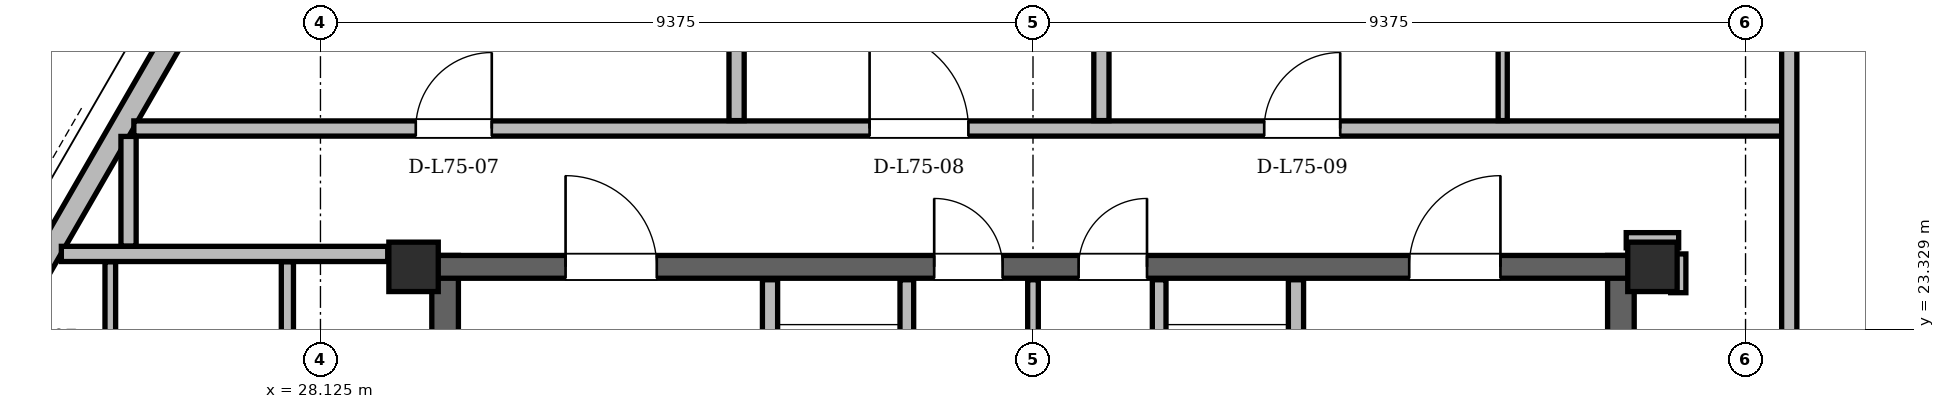
"""IFC4 building model, lengths in metres.
Left out: names, types, materials, properties, quantities, classifications, styles, units other than length and angle.
Written with IfcOpenShell. Run it as: python <this file> out.ifc"""

import sys

from ifc_helpers import new_model, si_unit, direction, frame, frame_2d, origin, origin_2d, place, context, subcontext, project, spatial, rectangle, hollow_rectangle, extrude, element, fill, save


model = new_model("IFC4")
c1 = context("Model", 3, precision=1e-05, world=origin(), true_north=direction((0.0, 1.0)))
c2 = subcontext(c1, "Body", "Model", "MODEL_VIEW")
j1 = project(units=[si_unit("LENGTHUNIT", "METRE"), si_unit("PLANEANGLEUNIT", "RADIAN")], contexts=[c1])
p1 = place(None, origin())
s1 = spatial("IfcSite", under=j1, at=p1, CompositionType="ELEMENT")
p2 = place(p1, origin())
s2 = spatial("IfcBuilding", under=s1, at=p2, CompositionType="ELEMENT")
p3 = place(p2, frame((0.0, 0.0, 285.0)))
s3 = spatial("IfcBuildingStorey", under=s2, at=p3, CompositionType="ELEMENT", Elevation=285.0)
for number, where, z_axis, x_axis in (
    (1, (45.65, 24.15, 0.0), (0.0, 0.0, 1.0), (1.0, 0.0, 0.0)),
    (2, (29.35, 24.15, 0.0), (0.0, 0.0, 1.0), (1.0, 0.0, 0.0)),
):
    element("IfcColumn", number, at=place(p3, frame(where, z_axis=z_axis, x_axis=x_axis)), inside=s3, PredefinedType="COLUMN", context=c2, shape_type="SweptSolid", body=[
        extrude(hollow_rectangle(XDim=0.65, YDim=0.65, WallThickness=0.05, at=origin_2d()), origin(), (0.0, 0.0, 1.0), 3.9),
    ])
for number, where, z_axis, x_axis in (
    (3, (29.765, 11.0, 0.0), (0.0, 0.0, 1.0), (0.0, 1.0, 0.0)),
    (4, (45.235, 11.0, 0.0), (0.0, 0.0, 1.0), (0.0, 1.0, 0.0)),
):
    element("IfcWall", number, at=place(p3, frame(where, z_axis=z_axis, x_axis=x_axis)), inside=s3, PredefinedType="SHEAR", context=c2, shape_type="SweptSolid", body=[
        extrude(rectangle(XDim=13.3, YDim=0.35, at=frame_2d((6.65, 0.0))), origin(), (0.0, 0.0, 1.0), 3.68),
    ])
p4 = place(p3, frame((29.65, 24.15, 0.0), z_axis=(0.0, 0.0, 1.0), x_axis=(1.0, 0.0, 0.0)))
e5 = element("IfcWall", 5, at=p4, inside=s3, PredefinedType="SHEAR", context=c2, shape_type="SweptSolid", body=[
    extrude(rectangle(XDim=15.7, YDim=0.3, at=frame_2d((7.85, 0.0))), origin(), (0.0, 0.0, 1.0), 3.68),
])
p5 = place(p4, frame((1.7, 0.0, 0.0)))
e6 = element("IfcOpeningElement", 6, at=p5, cuts=e5, PredefinedType="OPENING", context=c2, shape_type="SweptSolid", body=[
    extrude(rectangle(XDim=1.2, YDim=2.2, at=frame_2d((0.6, 1.1))), frame((0.0, 0.15, 0.0), z_axis=(0.0, -1.0, 0.0), x_axis=(1.0, 0.0, 0.0)), (0.0, 0.0, 1.0), 0.3),
])
p6 = place(p4, frame((12.8, 0.0, 0.0)))
e7 = element("IfcOpeningElement", 7, at=p6, cuts=e5, PredefinedType="OPENING", context=c2, shape_type="SweptSolid", body=[
    extrude(rectangle(XDim=1.2, YDim=2.2, at=frame_2d((0.6, 1.1))), frame((0.0, 0.15, 0.0), z_axis=(0.0, -1.0, 0.0), x_axis=(1.0, 0.0, 0.0)), (0.0, 0.0, 1.0), 0.3),
])
p7 = place(p4, frame((6.55, 0.0, 0.0)))
e8 = element("IfcOpeningElement", 8, at=p7, cuts=e5, PredefinedType="OPENING", context=c2, shape_type="SweptSolid", body=[
    extrude(rectangle(XDim=0.9, YDim=2.05, at=frame_2d((0.45, 1.025))), frame((0.0, 0.15, 0.0), z_axis=(0.0, -1.0, 0.0), x_axis=(1.0, 0.0, 0.0)), (0.0, 0.0, 1.0), 0.3),
])
p8 = place(p4, frame((8.45, 0.0, 0.0)))
e9 = element("IfcOpeningElement", 9, at=p8, cuts=e5, PredefinedType="OPENING", context=c2, shape_type="SweptSolid", body=[
    extrude(rectangle(XDim=0.9, YDim=2.05, at=frame_2d((0.45, 1.025))), frame((0.0, 0.15, 0.0), z_axis=(0.0, -1.0, 0.0), x_axis=(1.0, 0.0, 0.0)), (0.0, 0.0, 1.0), 0.3),
])
p9 = place(p3, frame((58.415, 10.535, 0.0), z_axis=(0.0, 0.0, 1.0), x_axis=(-0.499999864727, 0.866025481884, 0.0)))
e10 = element("IfcWall", 10, at=p9, inside=s3, PredefinedType="SOLIDWALL", context=c2, shape_type="SweptSolid", body=[
    extrude(rectangle(XDim=37.481, YDim=0.29, at=frame_2d((18.74, 0.0))), origin(), (0.0, 0.0, 1.0), 3.058),
])
p10 = place(p9, frame((7.504, 0.0, 0.0)))
e11 = element("IfcOpeningElement", 11, at=p10, cuts=e10, PredefinedType="OPENING", context=c2, shape_type="SweptSolid", body=[
    extrude(rectangle(XDim=1.3, YDim=2.2, at=frame_2d((0.65, 1.1))), frame((0.0, 0.145, 0.0), z_axis=(0.0, -1.0, 0.0), x_axis=(1.0, 0.0, 0.0)), (0.0, 0.0, 1.0), 0.29),
])
p11 = place(p9, frame((32.341, 0.0, 0.0)))
e12 = element("IfcOpeningElement", 12, at=p11, cuts=e10, PredefinedType="OPENING", context=c2, shape_type="SweptSolid", body=[
    extrude(rectangle(XDim=1.5, YDim=2.2, at=frame_2d((0.75, 1.1))), frame((0.0, 0.145, 0.0), z_axis=(0.0, -1.0, 0.0), x_axis=(1.0, 0.0, 0.0)), (0.0, 0.0, 1.0), 0.29),
])
p12 = place(p9, frame((12.54, 0.0, 0.85)))
e13 = element("IfcOpeningElement", 13, at=p12, cuts=e10, PredefinedType="OPENING", context=c2, shape_type="SweptSolid", body=[
    extrude(rectangle(XDim=1.4, YDim=1.6, at=frame_2d((0.7, 0.8))), frame((0.0, 0.145, 0.0), z_axis=(0.0, -1.0, 0.0), x_axis=(1.0, 0.0, 0.0)), (0.0, 0.0, 1.0), 0.29),
])
p13 = place(p9, frame((17.705, 0.0, 0.85)))
e14 = element("IfcOpeningElement", 14, at=p13, cuts=e10, PredefinedType="OPENING", context=c2, shape_type="SweptSolid", body=[
    extrude(rectangle(XDim=2.5, YDim=2.098, at=frame_2d((1.25, 1.049))), frame((0.0, 0.145, 0.0), z_axis=(0.0, -1.0, 0.0), x_axis=(1.0, 0.0, 0.0)), (0.0, 0.0, 1.0), 0.29),
])
p14 = place(p9, frame((2.467, 0.0, 0.85)))
e15 = element("IfcOpeningElement", 15, at=p14, cuts=e10, PredefinedType="OPENING", context=c2, shape_type="SweptSolid", body=[
    extrude(rectangle(XDim=2.5, YDim=2.098, at=frame_2d((1.25, 1.049))), frame((0.0, 0.145, 0.0), z_axis=(0.0, -1.0, 0.0), x_axis=(1.0, 0.0, 0.0)), (0.0, 0.0, 1.0), 0.29),
])
p15 = place(p9, frame((27.081, 0.0, 0.85)))
e16 = element("IfcOpeningElement", 16, at=p15, cuts=e10, PredefinedType="OPENING", context=c2, shape_type="SweptSolid", body=[
    extrude(rectangle(XDim=1.2, YDim=1.48, at=frame_2d((0.6, 0.74))), frame((0.0, 0.145, 0.0), z_axis=(0.0, -1.0, 0.0), x_axis=(1.0, 0.0, 0.0)), (0.0, 0.0, 1.0), 0.29),
])
p16 = place(p9, frame((34.388, 0.0, 0.85)))
e17 = element("IfcOpeningElement", 17, at=p16, cuts=e10, PredefinedType="OPENING", context=c2, shape_type="SweptSolid", body=[
    extrude(rectangle(XDim=1.8, YDim=1.75, at=frame_2d((0.9, 0.875))), frame((0.0, 0.145, 0.0), z_axis=(0.0, -1.0, 0.0), x_axis=(1.0, 0.0, 0.0)), (0.0, 0.0, 1.0), 0.29),
])
p17 = place(p9, frame((22.312, 0.0, 0.85)))
e18 = element("IfcOpeningElement", 18, at=p17, cuts=e10, PredefinedType="OPENING", context=c2, shape_type="SweptSolid", body=[
    extrude(rectangle(XDim=1.2, YDim=1.48, at=frame_2d((0.6, 0.74))), frame((0.0, 0.145, 0.0), z_axis=(0.0, -1.0, 0.0), x_axis=(1.0, 0.0, 0.0)), (0.0, 0.0, 1.0), 0.29),
])
p18 = place(p3, frame((35.326, 42.995, 0.0), z_axis=(0.0, 0.0, 1.0), x_axis=(-0.499999864727, -0.866025481884, 0.0)))
e19 = element("IfcWall", 19, at=p18, inside=s3, PredefinedType="SOLIDWALL", context=c2, shape_type="SweptSolid", body=[
    extrude(rectangle(XDim=37.481, YDim=0.29, at=frame_2d((18.74, 0.0))), origin(), (0.0, 0.0, 1.0), 3.058),
])
p19 = place(p18, frame((8.034, 0.0, 0.0)))
e20 = element("IfcOpeningElement", 20, at=p19, cuts=e19, PredefinedType="OPENING", context=c2, shape_type="SweptSolid", body=[
    extrude(rectangle(XDim=1.5, YDim=2.2, at=frame_2d((0.75, 1.1))), frame((0.0, 0.145, 0.0), z_axis=(0.0, -1.0, 0.0), x_axis=(1.0, 0.0, 0.0)), (0.0, 0.0, 1.0), 0.29),
])
p20 = place(p18, frame((32.341, 0.0, 0.0)))
e21 = element("IfcOpeningElement", 21, at=p20, cuts=e19, PredefinedType="OPENING", context=c2, shape_type="SweptSolid", body=[
    extrude(rectangle(XDim=1.5, YDim=2.2, at=frame_2d((0.75, 1.1))), frame((0.0, 0.145, 0.0), z_axis=(0.0, -1.0, 0.0), x_axis=(1.0, 0.0, 0.0)), (0.0, 0.0, 1.0), 0.29),
])
p21 = place(p18, frame((35.454, 0.0, 0.85)))
e22 = element("IfcOpeningElement", 22, at=p21, cuts=e19, PredefinedType="OPENING", context=c2, shape_type="SweptSolid", body=[
    extrude(rectangle(XDim=1.2, YDim=1.48, at=frame_2d((0.6, 0.74))), frame((0.0, 0.145, 0.0), z_axis=(0.0, -1.0, 0.0), x_axis=(1.0, 0.0, 0.0)), (0.0, 0.0, 1.0), 0.29),
])
p22 = place(p18, frame((27.367, 0.0, 0.85)))
e23 = element("IfcOpeningElement", 23, at=p22, cuts=e19, PredefinedType="OPENING", context=c2, shape_type="SweptSolid", body=[
    extrude(rectangle(XDim=1.8, YDim=1.75, at=frame_2d((0.9, 0.875))), frame((0.0, 0.145, 0.0), z_axis=(0.0, -1.0, 0.0), x_axis=(1.0, 0.0, 0.0)), (0.0, 0.0, 1.0), 0.29),
])
p23 = place(p18, frame((21.75, 0.0, 0.85)))
e24 = element("IfcOpeningElement", 24, at=p23, cuts=e19, PredefinedType="OPENING", context=c2, shape_type="SweptSolid", body=[
    extrude(rectangle(XDim=1.6, YDim=1.7, at=frame_2d((0.8, 0.85))), frame((0.0, 0.145, 0.0), z_axis=(0.0, -1.0, 0.0), x_axis=(1.0, 0.0, 0.0)), (0.0, 0.0, 1.0), 0.29),
])
p24 = place(p18, frame((16.51, 0.0, 0.85)))
e25 = element("IfcOpeningElement", 25, at=p24, cuts=e19, PredefinedType="OPENING", context=c2, shape_type="SweptSolid", body=[
    extrude(rectangle(XDim=1.8, YDim=1.75, at=frame_2d((0.9, 0.875))), frame((0.0, 0.145, 0.0), z_axis=(0.0, -1.0, 0.0), x_axis=(1.0, 0.0, 0.0)), (0.0, 0.0, 1.0), 0.29),
])
p25 = place(p18, frame((3.652, 0.0, 0.85)))
e26 = element("IfcOpeningElement", 26, at=p25, cuts=e19, PredefinedType="OPENING", context=c2, shape_type="SweptSolid", body=[
    extrude(rectangle(XDim=1.2, YDim=1.48, at=frame_2d((0.6, 0.74))), frame((0.0, 0.145, 0.0), z_axis=(0.0, -1.0, 0.0), x_axis=(1.0, 0.0, 0.0)), (0.0, 0.0, 1.0), 0.29),
])
p26 = place(p18, frame((1.094, 0.0, 0.85)))
e27 = element("IfcOpeningElement", 27, at=p26, cuts=e19, PredefinedType="OPENING", context=c2, shape_type="SweptSolid", body=[
    extrude(rectangle(XDim=1.2, YDim=1.48, at=frame_2d((0.6, 0.74))), frame((0.0, 0.145, 0.0), z_axis=(0.0, -1.0, 0.0), x_axis=(1.0, 0.0, 0.0)), (0.0, 0.0, 1.0), 0.29),
])
p27 = place(p3, frame((34.04, 19.48, 0.0), z_axis=(0.0, 0.0, 1.0), x_axis=(0.0, 1.0, 0.0)))
e28 = element("IfcWall", 28, at=p27, inside=s3, PredefinedType="PARTITIONING", context=c2, shape_type="SweptSolid", body=[
    extrude(rectangle(XDim=4.5, YDim=0.2, at=frame_2d((2.25, 0.0))), origin(), (0.0, 0.0, 1.0), 3.68),
])
p28 = place(p27, frame((2.12, 0.0, 0.0)))
e29 = element("IfcOpeningElement", 29, at=p28, cuts=e28, PredefinedType="OPENING", context=c2, shape_type="SweptSolid", body=[
    extrude(rectangle(XDim=1.1, YDim=2.2, at=frame_2d((0.55, 1.1))), frame((0.0, 0.1, 0.0), z_axis=(0.0, -1.0, 0.0), x_axis=(1.0, 0.0, 0.0)), (0.0, 0.0, 1.0), 0.2),
])
p29 = place(p3, frame((35.84, 20.96, 0.0), z_axis=(0.0, 0.0, 1.0), x_axis=(0.0, 1.0, 0.0)))
e30 = element("IfcWall", 30, at=p29, inside=s3, PredefinedType="PARTITIONING", context=c2, shape_type="SweptSolid", body=[
    extrude(rectangle(XDim=3.02, YDim=0.18, at=frame_2d((1.51, 0.0))), origin(), (0.0, 0.0, 1.0), 3.68),
])
p30 = place(p3, frame((40.96, 19.48, 0.0), z_axis=(0.0, 0.0, 1.0), x_axis=(0.0, 1.0, 0.0)))
e31 = element("IfcWall", 31, at=p30, inside=s3, PredefinedType="PARTITIONING", context=c2, shape_type="SweptSolid", body=[
    extrude(rectangle(XDim=4.5, YDim=0.2, at=frame_2d((2.25, 0.0))), origin(), (0.0, 0.0, 1.0), 3.68),
])
p31 = place(p30, frame((2.12, 0.0, 0.0)))
e32 = element("IfcOpeningElement", 32, at=p31, cuts=e31, PredefinedType="OPENING", context=c2, shape_type="SweptSolid", body=[
    extrude(rectangle(XDim=1.1, YDim=2.2, at=frame_2d((0.55, 1.1))), frame((0.0, 0.1, 0.0), z_axis=(0.0, -1.0, 0.0), x_axis=(1.0, 0.0, 0.0)), (0.0, 0.0, 1.0), 0.2),
])
p32 = place(p3, frame((39.16, 20.96, 0.0), z_axis=(0.0, 0.0, 1.0), x_axis=(0.0, 1.0, 0.0)))
e33 = element("IfcWall", 33, at=p32, inside=s3, PredefinedType="PARTITIONING", context=c2, shape_type="SweptSolid", body=[
    extrude(rectangle(XDim=3.02, YDim=0.18, at=frame_2d((1.51, 0.0))), origin(), (0.0, 0.0, 1.0), 3.68),
])
p33 = place(p3, frame((37.5, 21.06, 0.0), z_axis=(0.0, 0.0, 1.0), x_axis=(0.0, 1.0, 0.0)))
e34 = element("IfcWall", 34, at=p33, inside=s3, PredefinedType="PARTITIONING", context=c2, shape_type="SweptSolid", body=[
    extrude(rectangle(XDim=2.92, YDim=0.14, at=frame_2d((1.46, 0.0))), origin(), (0.0, 0.0, 1.0), 3.68),
])
p34 = place(p3, frame((24.716, 24.32, 0.0), z_axis=(0.0, 0.0, 1.0), x_axis=(1.0, 0.0, 0.0)))
e35 = element("IfcWall", 35, at=p34, inside=s3, PredefinedType="PARTITIONING", context=c2, shape_type="SweptSolid", body=[
    extrude(rectangle(XDim=4.294, YDim=0.2, at=frame_2d((2.147, 0.0))), origin(), (0.0, 0.0, 1.0), 3.68),
])
p35 = place(p3, frame((45.305, 24.5, 0.0), z_axis=(0.0, 0.0, 1.0), x_axis=(1.0, 0.0, 0.0)))
e36 = element("IfcWall", 36, at=p35, inside=s3, PredefinedType="PARTITIONING", context=c2, shape_type="SweptSolid", body=[
    extrude(rectangle(XDim=0.69, YDim=0.2, at=frame_2d((0.345, 0.0))), origin(), (0.0, 0.0, 1.0), 3.266),
])
p36 = place(p3, frame((25.67, 25.97, 0.0), z_axis=(0.0, 0.0, 1.0), x_axis=(1.0, 0.0, 0.0)))
e37 = element("IfcWall", 37, at=p36, inside=s3, PredefinedType="PARTITIONING", context=c2, shape_type="SweptSolid", body=[
    extrude(rectangle(XDim=21.78, YDim=0.2, at=frame_2d((10.89, 0.0))), origin(), (0.0, 0.0, 1.0), 3.266),
])
p37 = place(p36, frame((3.709, 0.0, 0.0)))
e38 = element("IfcOpeningElement", 38, at=p37, cuts=e37, PredefinedType="OPENING", context=c2, shape_type="SweptSolid", body=[
    extrude(rectangle(XDim=1.0, YDim=2.18, at=frame_2d((0.5, 1.09))), frame((0.0, 0.1, 0.0), z_axis=(0.0, -1.0, 0.0), x_axis=(1.0, 0.0, 0.0)), (0.0, 0.0, 1.0), 0.2),
])
p38 = place(p36, frame((9.68, 0.0, 0.0)))
e39 = element("IfcOpeningElement", 39, at=p38, cuts=e37, PredefinedType="OPENING", context=c2, shape_type="SweptSolid", body=[
    extrude(rectangle(XDim=1.3, YDim=2.2, at=frame_2d((0.65, 1.1))), frame((0.0, 0.1, 0.0), z_axis=(0.0, -1.0, 0.0), x_axis=(1.0, 0.0, 0.0)), (0.0, 0.0, 1.0), 0.2),
])
p39 = place(p36, frame((14.872, 0.0, 0.0)))
e40 = element("IfcOpeningElement", 40, at=p39, cuts=e37, PredefinedType="OPENING", context=c2, shape_type="SweptSolid", body=[
    extrude(rectangle(XDim=1.0, YDim=2.18, at=frame_2d((0.5, 1.09))), frame((0.0, 0.1, 0.0), z_axis=(0.0, -1.0, 0.0), x_axis=(1.0, 0.0, 0.0)), (0.0, 0.0, 1.0), 0.2),
])
p40 = place(p3, frame((25.36, 19.574, 0.0), z_axis=(0.0, 0.0, 1.0), x_axis=(0.0, 1.0, 0.0)))
e41 = element("IfcWall", 41, at=p40, inside=s3, PredefinedType="PARTITIONING", context=c2, shape_type="SweptSolid", body=[
    extrude(rectangle(XDim=4.642, YDim=0.14, at=frame_2d((2.321, 0.0))), origin(), (0.0, 0.0, 1.0), 3.68),
])
p41 = place(p3, frame((25.6, 24.424, 0.0), z_axis=(0.0, 0.0, 1.0), x_axis=(0.0, 1.0, 0.0)))
e42 = element("IfcWall", 42, at=p41, inside=s3, PredefinedType="PARTITIONING", context=c2, shape_type="SweptSolid", body=[
    extrude(rectangle(XDim=1.442, YDim=0.2, at=frame_2d((0.721, 0.0))), origin(), (0.0, 0.0, 1.0), 3.058),
])
p42 = place(p3, frame((27.69, 19.574, 0.0), z_axis=(0.0, 0.0, 1.0), x_axis=(0.0, 1.0, 0.0)))
e43 = element("IfcWall", 43, at=p42, inside=s3, PredefinedType="PARTITIONING", context=c2, shape_type="SweptSolid", body=[
    extrude(rectangle(XDim=4.642, YDim=0.16, at=frame_2d((2.321, 0.0))), origin(), (0.0, 0.0, 1.0), 3.68),
])
for number, where, z_axis, x_axis in (
    (44, (33.6, 26.074, 0.0), (0.0, 0.0, 1.0), (0.0, 1.0, 0.0)),
    (45, (38.4, 26.074, 0.0), (0.0, 0.0, 1.0), (0.0, 1.0, 0.0)),
):
    element("IfcWall", number, at=place(p3, frame(where, z_axis=z_axis, x_axis=x_axis)), inside=s3, PredefinedType="PARTITIONING", context=c2, shape_type="SweptSolid", body=[
        extrude(rectangle(XDim=4.292, YDim=0.2, at=frame_2d((2.146, 0.0))), origin(), (0.0, 0.0, 1.0), 3.68),
    ])
p43 = place(p3, frame((43.68, 26.074, 0.0), z_axis=(0.0, 0.0, 1.0), x_axis=(0.0, 1.0, 0.0)))
e46 = element("IfcWall", 46, at=p43, inside=s3, PredefinedType="PARTITIONING", context=c2, shape_type="SweptSolid", body=[
    extrude(rectangle(XDim=9.684, YDim=0.12, at=frame_2d((4.842, 0.0))), origin(), (0.0, 0.0, 1.0), 3.266),
])
p44 = place(p43, frame((4.348, 0.0, 0.0)))
e47 = element("IfcOpeningElement", 47, at=p44, cuts=e46, PredefinedType="OPENING", context=c2, shape_type="SweptSolid", body=[
    extrude(rectangle(XDim=0.88, YDim=2.08, at=frame_2d((0.44, 1.04))), frame((0.0, 0.06, 0.0), z_axis=(0.0, -1.0, 0.0), x_axis=(1.0, 0.0, 0.0)), (0.0, 0.0, 1.0), 0.12),
])
p45 = place(p3, frame((45.99, 23.81, 0.0), z_axis=(0.0, 0.0, 1.0), x_axis=(0.0, 1.0, 0.0)))
e48 = element("IfcWall", 48, at=p45, inside=s3, PredefinedType="PARTITIONING", context=c2, shape_type="SweptSolid", body=[
    extrude(rectangle(XDim=0.51, YDim=0.2, at=frame_2d((0.255, 0.0))), origin(), (0.0, 0.0, 1.0), 3.68),
])
p46 = place(p3, frame((47.45, 6.919, 0.0), z_axis=(0.0, 0.0, 1.0), x_axis=(0.0, 1.0, 0.0)))
e49 = element("IfcWall", 49, at=p46, inside=s3, PredefinedType="PARTITIONING", context=c2, shape_type="SweptSolid", body=[
    extrude(rectangle(XDim=22.31, YDim=0.2, at=frame_2d((11.155, 0.0))), origin(), (0.0, 0.0, 1.0), 3.058),
])
p47 = place(p46, frame((10.142, 0.0, 0.0)))
e50 = element("IfcOpeningElement", 50, at=p47, cuts=e49, PredefinedType="OPENING", context=c2, shape_type="SweptSolid", body=[
    extrude(rectangle(XDim=1.0, YDim=2.18, at=frame_2d((0.5, 1.09))), frame((0.0, 0.1, 0.0), z_axis=(0.0, -1.0, 0.0), x_axis=(1.0, 0.0, 0.0)), (0.0, 0.0, 1.0), 0.2),
])
p48 = place(p13, origin())
e51 = element("IfcWindow", 51, at=p48, inside=s3, PartitioningType="SINGLE_PANEL", PredefinedType="WINDOW", context=c2, shape_type="SweptSolid", body=[
    extrude(rectangle(XDim=2.5, YDim=2.098, at=frame_2d((1.25, 1.049))), frame((0.0, 0.03, 0.0), z_axis=(0.0, -1.0, 0.0), x_axis=(1.0, 0.0, 0.0)), (0.0, 0.0, 1.0), 0.06),
])
fill(e14, e51)
p49 = place(p5, origin())
e52 = element("IfcDoor", 52, at=p49, inside=s3, OperationType="SINGLE_SWING_LEFT", PredefinedType="DOOR", context=c2, shape_type="SweptSolid", body=[
    extrude(rectangle(XDim=1.2, YDim=2.2, at=frame_2d((0.6, 1.1))), frame((0.0, 0.025, 0.0), z_axis=(0.0, -1.0, 0.0), x_axis=(1.0, 0.0, 0.0)), (0.0, 0.0, 1.0), 0.05),
])
fill(e6, e52)
p50 = place(p6, origin())
e53 = element("IfcDoor", 53, at=p50, inside=s3, OperationType="SINGLE_SWING_RIGHT", PredefinedType="DOOR", context=c2, shape_type="SweptSolid", body=[
    extrude(rectangle(XDim=1.2, YDim=2.2, at=frame_2d((0.6, 1.1))), frame((0.0, 0.025, 0.0), z_axis=(0.0, -1.0, 0.0), x_axis=(1.0, 0.0, 0.0)), (0.0, 0.0, 1.0), 0.05),
])
fill(e7, e53)
p51 = place(p7, origin())
e54 = element("IfcDoor", 54, at=p51, inside=s3, OperationType="SINGLE_SWING_LEFT", PredefinedType="DOOR", context=c2, shape_type="SweptSolid", body=[
    extrude(rectangle(XDim=0.9, YDim=2.05, at=frame_2d((0.45, 1.025))), frame((0.0, 0.025, 0.0), z_axis=(0.0, -1.0, 0.0), x_axis=(1.0, 0.0, 0.0)), (0.0, 0.0, 1.0), 0.05),
])
fill(e8, e54)
p52 = place(p8, origin())
e55 = element("IfcDoor", 55, at=p52, inside=s3, OperationType="SINGLE_SWING_RIGHT", PredefinedType="DOOR", context=c2, shape_type="SweptSolid", body=[
    extrude(rectangle(XDim=0.9, YDim=2.05, at=frame_2d((0.45, 1.025))), frame((0.0, 0.025, 0.0), z_axis=(0.0, -1.0, 0.0), x_axis=(1.0, 0.0, 0.0)), (0.0, 0.0, 1.0), 0.05),
])
fill(e9, e55)
p53 = place(p37, origin())
e56 = element("IfcDoor", 56, at=p53, inside=s3, OperationType="SINGLE_SWING_RIGHT", PredefinedType="DOOR", context=c2, shape_type="SweptSolid", body=[
    extrude(rectangle(XDim=1.0, YDim=2.18, at=frame_2d((0.5, 1.09))), frame((0.0, 0.025, 0.0), z_axis=(0.0, -1.0, 0.0), x_axis=(1.0, 0.0, 0.0)), (0.0, 0.0, 1.0), 0.05),
])
fill(e38, e56)
p54 = place(p38, origin())
e57 = element("IfcDoor", 57, at=p54, inside=s3, OperationType="SINGLE_SWING_LEFT", PredefinedType="DOOR", context=c2, shape_type="SweptSolid", body=[
    extrude(rectangle(XDim=1.3, YDim=2.2, at=frame_2d((0.65, 1.1))), frame((0.0, 0.025, 0.0), z_axis=(0.0, -1.0, 0.0), x_axis=(1.0, 0.0, 0.0)), (0.0, 0.0, 1.0), 0.05),
])
fill(e39, e57)
p55 = place(p39, origin())
e58 = element("IfcDoor", 58, at=p55, inside=s3, OperationType="SINGLE_SWING_RIGHT", PredefinedType="DOOR", context=c2, shape_type="SweptSolid", body=[
    extrude(rectangle(XDim=1.0, YDim=2.18, at=frame_2d((0.5, 1.09))), frame((0.0, 0.025, 0.0), z_axis=(0.0, -1.0, 0.0), x_axis=(1.0, 0.0, 0.0)), (0.0, 0.0, 1.0), 0.05),
])
fill(e40, e58)
save(model, sys.argv[1])
